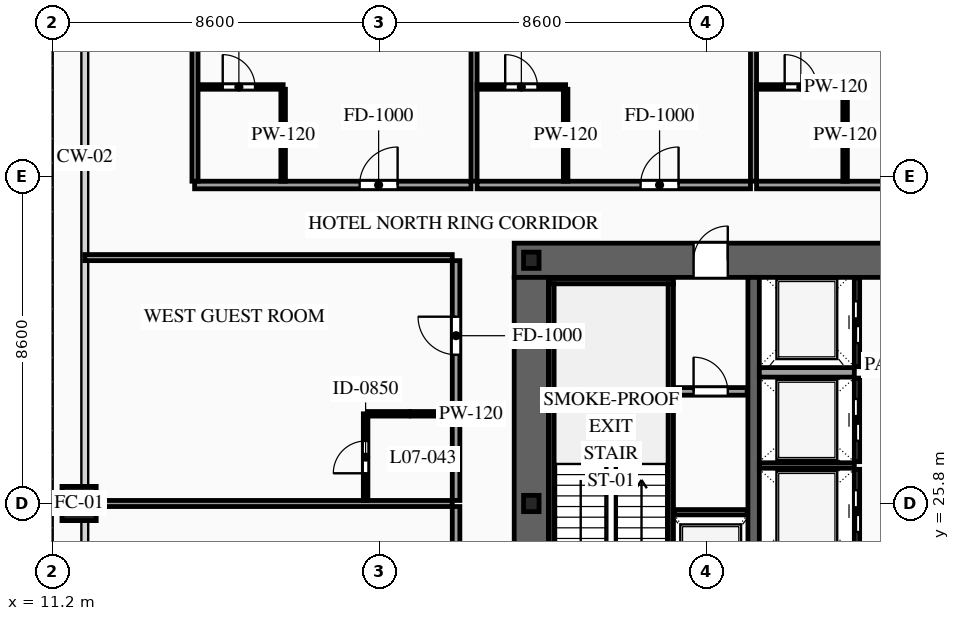
"""IFC4 building model, lengths in metres.
Left out: names, types, materials, properties, quantities, classifications, styles, units other than length and angle.
Written with IfcOpenShell. Run it as: python <this file> out.ifc"""

import sys

from ifc_helpers import new_model, si_unit, direction, frame, frame_2d, origin, origin_2d, place, context, subcontext, project, spatial, rectangle, hollow_rectangle, i_section, extrude, source, transform, mapped, element, fill, save


model = new_model("IFC4")
c1 = context("Model", 3, precision=1e-05, world=origin(), true_north=direction((0.0, 1.0)))
c2 = subcontext(c1, "Body", "Model", "MODEL_VIEW")
j1 = project(units=[si_unit("LENGTHUNIT", "METRE"), si_unit("PLANEANGLEUNIT", "RADIAN")], contexts=[c1])
p1 = place(None, origin())
s1 = spatial("IfcSite", under=j1, at=p1, CompositionType="ELEMENT")
p2 = place(p1, origin())
s2 = spatial("IfcBuilding", under=s1, at=p2, CompositionType="ELEMENT")
p3 = place(p2, frame((0.0, 0.0, 30.6)))
s3 = spatial("IfcBuildingStorey", under=s2, at=p3, CompositionType="ELEMENT", Elevation=30.6)
p4 = place(p3, frame((23.35, 32.2, 0.0), z_axis=(0.0, 0.0, 1.0), x_axis=(1.0, 0.0, 0.0)))
e1 = element("IfcWall", 1, at=p4, inside=s3, PredefinedType="SHEAR", context=c2, shape_type="SweptSolid", body=[
    extrude(rectangle(XDim=27.3, YDim=0.9, at=frame_2d((13.65, 0.0))), origin(), (0.0, 0.0, 1.0), 3.6),
])
p5 = place(p4, frame((4.72, 0.0, 0.0)))
e2 = element("IfcOpeningElement", 2, at=p5, cuts=e1, PredefinedType="OPENING", context=c2, shape_type="SweptSolid", body=[
    extrude(rectangle(XDim=0.9, YDim=2.15, at=frame_2d((0.45, 1.075))), frame((0.0, 0.465, 0.0), z_axis=(0.0, -1.0, 0.0), x_axis=(1.0, 0.0, 0.0)), (0.0, 0.0, 1.0), 0.93),
])
p6 = place(p4, frame((10.0, 0.0, 0.0)))
e3 = element("IfcOpeningElement", 3, at=p6, cuts=e1, PredefinedType="OPENING", context=c2, shape_type="SweptSolid", body=[
    extrude(rectangle(XDim=1.1, YDim=2.2, at=frame_2d((0.55, 1.1))), frame((0.0, 0.465, 0.0), z_axis=(0.0, -1.0, 0.0), x_axis=(1.0, 0.0, 0.0)), (0.0, 0.0, 1.0), 0.93),
])
p7 = place(p4, frame((15.85, 0.0, 0.0)))
e4 = element("IfcOpeningElement", 4, at=p7, cuts=e1, PredefinedType="OPENING", context=c2, shape_type="SweptSolid", body=[
    extrude(rectangle(XDim=1.1, YDim=2.2, at=frame_2d((0.55, 1.1))), frame((0.0, 0.465, 0.0), z_axis=(0.0, -1.0, 0.0), x_axis=(1.0, 0.0, 0.0)), (0.0, 0.0, 1.0), 0.93),
])
m1 = source(origin(), c2, "Body", "SweptSolid", [
    extrude(rectangle(XDim=11.9, YDim=0.9, at=frame_2d((5.95, 0.0))), origin(), (0.0, 0.0, 1.0), 3.6),
])
p8 = place(p3, frame((23.8, 19.85, 0.0), z_axis=(0.0, 0.0, 1.0), x_axis=(0.0, 1.0, 0.0)))
e5 = element("IfcWall", 5, at=p8, inside=s3, PredefinedType="SHEAR", context=c2, shape_type="MappedRepresentation", body=[
    mapped(m1, transform((0.0, 0.0, 0.0), scale=1.0)),
])
m2 = source(origin(), c2, "Body", "SweptSolid", [
    extrude(rectangle(XDim=11.9, YDim=0.3, at=frame_2d((5.95, 0.0))), origin(), (0.0, 0.0, 1.0), 3.6),
])
p9 = place(p3, frame((29.65, 19.85, 0.0), z_axis=(0.0, 0.0, 1.0), x_axis=(0.0, 1.0, 0.0)))
e6 = element("IfcWall", 6, at=p9, inside=s3, PredefinedType="SOLIDWALL", context=c2, shape_type="MappedRepresentation", body=[
    mapped(m2, transform((0.0, 0.0, 0.0), scale=1.0)),
])
m3 = source(origin(), c2, "Body", "SweptSolid", [
    extrude(i_section(OverallWidth=0.407, OverallDepth=0.428, WebThickness=0.02, FlangeThickness=0.035, at=origin_2d()), origin(), (0.0, 0.0, 1.0), 3.6),
])
for number, where, z_axis, x_axis in (
    (7, (23.8, 25.8, 0.0), (0.0, 0.0, 1.0), (1.0, 0.0, 0.0)),
    (8, (23.8, 32.2, 0.0), (0.0, 0.0, 1.0), (1.0, 0.0, 0.0)),
):
    element("IfcColumn", number, at=place(p3, frame(where, z_axis=z_axis, x_axis=x_axis)), inside=s3, PredefinedType="COLUMN", context=c2, shape_type="MappedRepresentation", body=[
        mapped(m3, transform((0.0, 0.0, 0.0), scale=1.0)),
    ])
m4 = source(origin(), c2, "Body", "SweptSolid", [
    extrude(hollow_rectangle(XDim=0.9, YDim=0.9, WallThickness=0.042, at=origin_2d()), origin(), (0.0, 0.0, 1.0), 3.6),
])
p10 = place(p3, frame((11.9, 25.8, 0.0), z_axis=(0.0, 0.0, 1.0), x_axis=(1.0, 0.0, 0.0)))
e9 = element("IfcColumn", 9, at=p10, inside=s3, PredefinedType="COLUMN", context=c2, shape_type="MappedRepresentation", body=[
    mapped(m4, transform((0.0, 0.0, 0.0), scale=1.0)),
])
m5 = source(origin(), c2, "Body", "SweptSolid", [
    extrude(rectangle(XDim=1.92, YDim=0.14, at=frame_2d((0.96, 0.0))), origin(), (0.0, 0.0, 1.0), 3.38),
])
p11 = place(p3, frame((27.56, 25.57, 0.0), z_axis=(0.0, 0.0, 1.0), x_axis=(1.0, 0.0, 0.0)))
e10 = element("IfcWall", 10, at=p11, inside=s3, PredefinedType="SOLIDWALL", context=c2, shape_type="MappedRepresentation", body=[
    mapped(m5, transform((0.0, 0.0, 0.0), scale=1.0)),
])
p12 = place(p3, frame((32.37, 24.5, 0.0), z_axis=(0.0, 0.0, 1.0), x_axis=(0.0, 1.0, 0.0)))
e11 = element("IfcWall", 11, at=p12, inside=s3, PredefinedType="SOLIDWALL", context=c2, shape_type="SweptSolid", body=[
    extrude(rectangle(XDim=2.2, YDim=0.14, at=frame_2d((1.1, 0.0))), origin(), (0.0, 0.0, 1.0), 3.38),
])
p13 = place(p12, frame((0.55, 0.0, 0.0)))
e12 = element("IfcOpeningElement", 12, at=p13, cuts=e11, PredefinedType="OPENING", context=c2, shape_type="SweptSolid", body=[
    extrude(rectangle(XDim=1.1, YDim=2.2, at=frame_2d((0.55, 1.1))), frame((0.0, 0.085, 0.0), z_axis=(0.0, -1.0, 0.0), x_axis=(1.0, 0.0, 0.0)), (0.0, 0.0, 1.0), 0.17),
])
m6 = source(origin(), c2, "Body", "SweptSolid", [
    extrude(rectangle(XDim=2.5, YDim=0.14, at=frame_2d((1.25, 0.0))), origin(), (0.0, 0.0, 1.0), 3.38),
])
p14 = place(p3, frame((29.8, 26.8, 0.0), z_axis=(0.0, 0.0, 1.0), x_axis=(1.0, 0.0, 0.0)))
e13 = element("IfcWall", 13, at=p14, inside=s3, PredefinedType="SOLIDWALL", context=c2, shape_type="MappedRepresentation", body=[
    mapped(m6, transform((0.0, 0.0, 0.0), scale=1.0)),
])
p15 = place(p3, frame((32.37, 26.9, 0.0), z_axis=(0.0, 0.0, 1.0), x_axis=(0.0, 1.0, 0.0)))
e14 = element("IfcWall", 14, at=p15, inside=s3, PredefinedType="SOLIDWALL", context=c2, shape_type="SweptSolid", body=[
    extrude(rectangle(XDim=2.2, YDim=0.14, at=frame_2d((1.1, 0.0))), origin(), (0.0, 0.0, 1.0), 3.38),
])
p16 = place(p15, frame((0.55, 0.0, 0.0)))
e15 = element("IfcOpeningElement", 15, at=p16, cuts=e14, PredefinedType="OPENING", context=c2, shape_type="SweptSolid", body=[
    extrude(rectangle(XDim=1.1, YDim=2.2, at=frame_2d((0.55, 1.1))), frame((0.0, 0.085, 0.0), z_axis=(0.0, -1.0, 0.0), x_axis=(1.0, 0.0, 0.0)), (0.0, 0.0, 1.0), 0.17),
])
p17 = place(p3, frame((32.37, 29.4, 0.0), z_axis=(0.0, 0.0, 1.0), x_axis=(0.0, 1.0, 0.0)))
e16 = element("IfcWall", 16, at=p17, inside=s3, PredefinedType="SOLIDWALL", context=c2, shape_type="SweptSolid", body=[
    extrude(rectangle(XDim=2.34, YDim=0.14, at=frame_2d((1.17, 0.0))), origin(), (0.0, 0.0, 1.0), 3.38),
])
p18 = place(p17, frame((0.62, 0.0, 0.0)))
e17 = element("IfcOpeningElement", 17, at=p18, cuts=e16, PredefinedType="OPENING", context=c2, shape_type="SweptSolid", body=[
    extrude(rectangle(XDim=1.1, YDim=2.2, at=frame_2d((0.55, 1.1))), frame((0.0, 0.085, 0.0), z_axis=(0.0, -1.0, 0.0), x_axis=(1.0, 0.0, 0.0)), (0.0, 0.0, 1.0), 0.17),
])
m7 = source(origin(), c2, "Body", "SweptSolid", [
    extrude(rectangle(XDim=2.5, YDim=0.25, at=frame_2d((1.25, 0.0))), origin(), (0.0, 0.0, 1.0), 3.38),
])
p19 = place(p3, frame((29.8, 29.25, 0.0), z_axis=(0.0, 0.0, 1.0), x_axis=(1.0, 0.0, 0.0)))
e18 = element("IfcWall", 18, at=p19, inside=s3, PredefinedType="SOLIDWALL", context=c2, shape_type="MappedRepresentation", body=[
    mapped(m7, transform((0.0, 0.0, 0.0), scale=1.0)),
])
m8 = source(origin(), c2, "Body", "SweptSolid", [
    extrude(rectangle(XDim=3.28, YDim=0.14, at=frame_2d((1.64, 0.0))), origin(), (0.0, 0.0, 1.0), 3.38),
])
p20 = place(p3, frame((24.26, 31.65, 0.0), z_axis=(0.0, 0.0, 1.0), x_axis=(1.0, 0.0, 0.0)))
e19 = element("IfcWall", 19, at=p20, inside=s3, PredefinedType="SOLIDWALL", context=c2, shape_type="MappedRepresentation", body=[
    mapped(m8, transform((0.0, 0.0, 0.0), scale=1.0)),
])
m9 = source(origin(), c2, "Body", "SweptSolid", [
    extrude(rectangle(XDim=8.94, YDim=0.14, at=frame_2d((4.47, 0.0))), origin(), (0.0, 0.0, 1.0), 3.38),
])
for number, where, z_axis, x_axis in (
    (20, (24.33, 22.64, 0.0), (0.0, 0.0, 1.0), (0.0, 1.0, 0.0)),
    (21, (27.47, 22.64, 0.0), (0.0, 0.0, 1.0), (0.0, 1.0, 0.0)),
):
    element("IfcWall", number, at=place(p3, frame(where, z_axis=z_axis, x_axis=x_axis)), inside=s3, PredefinedType="SOLIDWALL", context=c2, shape_type="MappedRepresentation", body=[
        mapped(m9, transform((0.0, 0.0, 0.0), scale=1.0)),
    ])
p21 = place(p3, frame((27.56, 28.75, 0.0), z_axis=(0.0, 0.0, 1.0), x_axis=(1.0, 0.0, 0.0)))
e22 = element("IfcWall", 22, at=p21, inside=s3, PredefinedType="PARTITIONING", context=c2, shape_type="SweptSolid", body=[
    extrude(rectangle(XDim=1.92, YDim=0.2, at=frame_2d((0.96, 0.0))), origin(), (0.0, 0.0, 1.0), 3.38),
])
p22 = place(p21, frame((0.51, 0.0, 0.0)))
e23 = element("IfcOpeningElement", 23, at=p22, cuts=e22, PredefinedType="OPENING", context=c2, shape_type="SweptSolid", body=[
    extrude(rectangle(XDim=0.9, YDim=2.15, at=frame_2d((0.45, 1.075))), frame((0.0, 0.115, 0.0), z_axis=(0.0, -1.0, 0.0), x_axis=(1.0, 0.0, 0.0)), (0.0, 0.0, 1.0), 0.23),
])
p23 = place(p3, frame((14.94, 34.18, 0.0), z_axis=(0.0, 0.0, 1.0), x_axis=(1.0, 0.0, 0.0)))
e24 = element("IfcWall", 24, at=p23, inside=s3, PredefinedType="PARTITIONING", context=c2, shape_type="SweptSolid", body=[
    extrude(rectangle(XDim=7.273, YDim=0.2, at=frame_2d((3.636, 0.0))), origin(), (0.0, 0.0, 1.0), 3.38),
])
p24 = place(p23, frame((4.342, 0.0, 0.0)))
e25 = element("IfcOpeningElement", 25, at=p24, cuts=e24, PredefinedType="OPENING", context=c2, shape_type="SweptSolid", body=[
    extrude(rectangle(XDim=1.0, YDim=2.2, at=frame_2d((0.5, 1.1))), frame((0.0, 0.115, 0.0), z_axis=(0.0, -1.0, 0.0), x_axis=(1.0, 0.0, 0.0)), (0.0, 0.0, 1.0), 0.23),
])
m10 = source(origin(), c2, "Body", "SweptSolid", [
    extrude(rectangle(XDim=16.47, YDim=0.16, at=frame_2d((8.235, 0.0))), origin(), (0.0, 0.0, 1.0), 3.38),
])
p25 = place(p3, frame((22.293, 34.28, 0.0), z_axis=(0.0, 0.0, 1.0), x_axis=(0.0, 1.0, 0.0)))
e26 = element("IfcWall", 26, at=p25, inside=s3, PredefinedType="PARTITIONING", context=c2, shape_type="MappedRepresentation", body=[
    mapped(m10, transform((0.0, 0.0, 0.0), scale=1.0)),
])
p26 = place(p3, frame((14.94, 36.76, 0.0), z_axis=(0.0, 0.0, 1.0), x_axis=(1.0, 0.0, 0.0)))
e27 = element("IfcWall", 27, at=p26, inside=s3, PredefinedType="PARTITIONING", context=c2, shape_type="SweptSolid", body=[
    extrude(rectangle(XDim=2.33, YDim=0.12, at=frame_2d((1.165, 0.0))), origin(), (0.0, 0.0, 1.0), 3.38),
])
p27 = place(p26, frame((0.74, 0.0, 0.0)))
e28 = element("IfcOpeningElement", 28, at=p27, cuts=e27, PredefinedType="OPENING", context=c2, shape_type="SweptSolid", body=[
    extrude(rectangle(XDim=0.85, YDim=2.1, at=frame_2d((0.425, 1.05))), frame((0.0, 0.075, 0.0), z_axis=(0.0, -1.0, 0.0), x_axis=(1.0, 0.0, 0.0)), (0.0, 0.0, 1.0), 0.15),
])
m11 = source(origin(), c2, "Body", "SweptSolid", [
    extrude(rectangle(XDim=2.42, YDim=0.12, at=frame_2d((1.21, 0.0))), origin(), (0.0, 0.0, 1.0), 3.38),
])
p28 = place(p3, frame((17.27, 34.28, 0.0), z_axis=(0.0, 0.0, 1.0), x_axis=(0.0, 1.0, 0.0)))
e29 = element("IfcWall", 29, at=p28, inside=s3, PredefinedType="PARTITIONING", context=c2, shape_type="MappedRepresentation", body=[
    mapped(m11, transform((0.0, 0.0, 0.0), scale=1.0)),
])
p29 = place(p3, frame((22.373, 34.18, 0.0), z_axis=(0.0, 0.0, 1.0), x_axis=(1.0, 0.0, 0.0)))
e30 = element("IfcWall", 30, at=p29, inside=s3, PredefinedType="PARTITIONING", context=c2, shape_type="SweptSolid", body=[
    extrude(rectangle(XDim=7.194, YDim=0.2, at=frame_2d((3.597, 0.0))), origin(), (0.0, 0.0, 1.0), 3.38),
])
p30 = place(p29, frame((4.302, 0.0, 0.0)))
e31 = element("IfcOpeningElement", 31, at=p30, cuts=e30, PredefinedType="OPENING", context=c2, shape_type="SweptSolid", body=[
    extrude(rectangle(XDim=1.0, YDim=2.2, at=frame_2d((0.5, 1.1))), frame((0.0, 0.115, 0.0), z_axis=(0.0, -1.0, 0.0), x_axis=(1.0, 0.0, 0.0)), (0.0, 0.0, 1.0), 0.23),
])
p31 = place(p3, frame((29.647, 34.28, 0.0), z_axis=(0.0, 0.0, 1.0), x_axis=(0.0, 1.0, 0.0)))
e32 = element("IfcWall", 32, at=p31, inside=s3, PredefinedType="PARTITIONING", context=c2, shape_type="MappedRepresentation", body=[
    mapped(m10, transform((0.0, 0.0, 0.0), scale=1.0)),
])
p32 = place(p3, frame((22.373, 36.76, 0.0), z_axis=(0.0, 0.0, 1.0), x_axis=(1.0, 0.0, 0.0)))
e33 = element("IfcWall", 33, at=p32, inside=s3, PredefinedType="PARTITIONING", context=c2, shape_type="SweptSolid", body=[
    extrude(rectangle(XDim=2.33, YDim=0.12, at=frame_2d((1.165, 0.0))), origin(), (0.0, 0.0, 1.0), 3.38),
])
p33 = place(p32, frame((0.74, 0.0, 0.0)))
e34 = element("IfcOpeningElement", 34, at=p33, cuts=e33, PredefinedType="OPENING", context=c2, shape_type="SweptSolid", body=[
    extrude(rectangle(XDim=0.85, YDim=2.1, at=frame_2d((0.425, 1.05))), frame((0.0, 0.075, 0.0), z_axis=(0.0, -1.0, 0.0), x_axis=(1.0, 0.0, 0.0)), (0.0, 0.0, 1.0), 0.15),
])
p34 = place(p3, frame((24.703, 34.28, 0.0), z_axis=(0.0, 0.0, 1.0), x_axis=(0.0, 1.0, 0.0)))
e35 = element("IfcWall", 35, at=p34, inside=s3, PredefinedType="PARTITIONING", context=c2, shape_type="MappedRepresentation", body=[
    mapped(m11, transform((0.0, 0.0, 0.0), scale=1.0)),
])
p35 = place(p3, frame((29.727, 34.18, 0.0), z_axis=(0.0, 0.0, 1.0), x_axis=(1.0, 0.0, 0.0)))
e36 = element("IfcWall", 36, at=p35, inside=s3, PredefinedType="PARTITIONING", context=c2, shape_type="SweptSolid", body=[
    extrude(rectangle(XDim=7.193, YDim=0.2, at=frame_2d((3.596, 0.0))), origin(), (0.0, 0.0, 1.0), 3.38),
])
p36 = place(p35, frame((4.302, 0.0, 0.0)))
e37 = element("IfcOpeningElement", 37, at=p36, cuts=e36, PredefinedType="OPENING", context=c2, shape_type="SweptSolid", body=[
    extrude(rectangle(XDim=1.0, YDim=2.2, at=frame_2d((0.5, 1.1))), frame((0.0, 0.115, 0.0), z_axis=(0.0, -1.0, 0.0), x_axis=(1.0, 0.0, 0.0)), (0.0, 0.0, 1.0), 0.23),
])
p37 = place(p3, frame((29.727, 36.76, 0.0), z_axis=(0.0, 0.0, 1.0), x_axis=(1.0, 0.0, 0.0)))
e38 = element("IfcWall", 38, at=p37, inside=s3, PredefinedType="PARTITIONING", context=c2, shape_type="SweptSolid", body=[
    extrude(rectangle(XDim=2.33, YDim=0.12, at=frame_2d((1.165, 0.0))), origin(), (0.0, 0.0, 1.0), 3.38),
])
p38 = place(p37, frame((0.74, 0.0, 0.0)))
e39 = element("IfcOpeningElement", 39, at=p38, cuts=e38, PredefinedType="OPENING", context=c2, shape_type="SweptSolid", body=[
    extrude(rectangle(XDim=0.85, YDim=2.1, at=frame_2d((0.425, 1.05))), frame((0.0, 0.075, 0.0), z_axis=(0.0, -1.0, 0.0), x_axis=(1.0, 0.0, 0.0)), (0.0, 0.0, 1.0), 0.15),
])
p39 = place(p3, frame((32.057, 34.28, 0.0), z_axis=(0.0, 0.0, 1.0), x_axis=(0.0, 1.0, 0.0)))
e40 = element("IfcWall", 40, at=p39, inside=s3, PredefinedType="PARTITIONING", context=c2, shape_type="MappedRepresentation", body=[
    mapped(m11, transform((0.0, 0.0, 0.0), scale=1.0)),
])
m12 = source(origin(), c2, "Body", "SweptSolid", [
    extrude(rectangle(XDim=16.32, YDim=0.16, at=frame_2d((8.16, 0.0))), origin(), (0.0, 0.0, 1.0), 3.38),
])
p40 = place(p3, frame((14.95, 34.28, 0.0), z_axis=(0.0, 0.0, 1.0), x_axis=(0.0, 1.0, 0.0)))
e41 = element("IfcWall", 41, at=p40, inside=s3, PredefinedType="PARTITIONING", context=c2, shape_type="MappedRepresentation", body=[
    mapped(m12, transform((0.0, 0.0, 0.0), scale=1.0)),
])
p41 = place(p3, frame((21.82, 19.41, 0.0), z_axis=(0.0, 0.0, 1.0), x_axis=(0.0, 1.0, 0.0)))
e42 = element("IfcWall", 42, at=p41, inside=s3, PredefinedType="PARTITIONING", context=c2, shape_type="SweptSolid", body=[
    extrude(rectangle(XDim=6.31, YDim=0.2, at=frame_2d((3.155, 0.0))), origin(), (0.0, 0.0, 1.0), 3.38),
])
p42 = place(p41, frame((3.835, 0.0, 0.0)))
e43 = element("IfcOpeningElement", 43, at=p42, cuts=e42, PredefinedType="OPENING", context=c2, shape_type="SweptSolid", body=[
    extrude(rectangle(XDim=1.0, YDim=2.2, at=frame_2d((0.5, 1.1))), frame((0.0, 0.115, 0.0), z_axis=(0.0, -1.0, 0.0), x_axis=(1.0, 0.0, 0.0)), (0.0, 0.0, 1.0), 0.23),
])
m13 = source(origin(), c2, "Body", "SweptSolid", [
    extrude(rectangle(XDim=9.67, YDim=0.16, at=frame_2d((4.835, 0.0))), origin(), (0.0, 0.0, 1.0), 2.575),
])
p43 = place(p3, frame((12.05, 25.8, 0.0), z_axis=(0.0, 0.0, 1.0), x_axis=(1.0, 0.0, 0.0)))
e44 = element("IfcWall", 44, at=p43, inside=s3, PredefinedType="PARTITIONING", context=c2, shape_type="MappedRepresentation", body=[
    mapped(m13, transform((0.0, 0.0, 0.0), scale=1.0)),
])
p44 = place(p3, frame((21.82, 25.88, 0.0), z_axis=(0.0, 0.0, 1.0), x_axis=(0.0, 1.0, 0.0)))
e45 = element("IfcWall", 45, at=p44, inside=s3, PredefinedType="PARTITIONING", context=c2, shape_type="SweptSolid", body=[
    extrude(rectangle(XDim=6.31, YDim=0.2, at=frame_2d((3.155, 0.0))), origin(), (0.0, 0.0, 1.0), 3.38),
])
p45 = place(p44, frame((3.835, 0.0, 0.0)))
e46 = element("IfcOpeningElement", 46, at=p45, cuts=e45, PredefinedType="OPENING", context=c2, shape_type="SweptSolid", body=[
    extrude(rectangle(XDim=1.0, YDim=2.2, at=frame_2d((0.5, 1.1))), frame((0.0, 0.115, 0.0), z_axis=(0.0, -1.0, 0.0), x_axis=(1.0, 0.0, 0.0)), (0.0, 0.0, 1.0), 0.23),
])
m14 = source(origin(), c2, "Body", "SweptSolid", [
    extrude(rectangle(XDim=9.67, YDim=0.16, at=frame_2d((4.835, 0.0))), origin(), (0.0, 0.0, 1.0), 2.875),
])
p46 = place(p3, frame((12.05, 32.27, 0.0), z_axis=(0.0, 0.0, 1.0), x_axis=(1.0, 0.0, 0.0)))
e47 = element("IfcWall", 47, at=p46, inside=s3, PredefinedType="PARTITIONING", context=c2, shape_type="MappedRepresentation", body=[
    mapped(m14, transform((0.0, 0.0, 0.0), scale=1.0)),
])
p47 = place(p3, frame((19.44, 25.88, 0.0), z_axis=(0.0, 0.0, 1.0), x_axis=(0.0, 1.0, 0.0)))
e48 = element("IfcWall", 48, at=p47, inside=s3, PredefinedType="PARTITIONING", context=c2, shape_type="SweptSolid", body=[
    extrude(rectangle(XDim=2.28, YDim=0.12, at=frame_2d((1.14, 0.0))), origin(), (0.0, 0.0, 1.0), 3.38),
])
p48 = place(p47, frame((0.715, 0.0, 0.0)))
e49 = element("IfcOpeningElement", 49, at=p48, cuts=e48, PredefinedType="OPENING", context=c2, shape_type="SweptSolid", body=[
    extrude(rectangle(XDim=0.85, YDim=2.1, at=frame_2d((0.425, 1.05))), frame((0.0, 0.075, 0.0), z_axis=(0.0, -1.0, 0.0), x_axis=(1.0, 0.0, 0.0)), (0.0, 0.0, 1.0), 0.15),
])
m15 = source(origin(), c2, "Body", "SweptSolid", [
    extrude(rectangle(XDim=2.22, YDim=0.12, at=frame_2d((1.11, 0.0))), origin(), (0.0, 0.0, 1.0), 3.38),
])
p49 = place(p3, frame((19.5, 28.16, 0.0), z_axis=(0.0, 0.0, 1.0), x_axis=(1.0, 0.0, 0.0)))
e50 = element("IfcWall", 50, at=p49, inside=s3, PredefinedType="PARTITIONING", context=c2, shape_type="MappedRepresentation", body=[
    mapped(m15, transform((0.0, 0.0, 0.0), scale=1.0)),
])
m16 = source(origin(), c2, "Body", "SweptSolid", [
    extrude(rectangle(XDim=1.1, YDim=2.2, at=frame_2d((0.55, 1.1))), frame((0.0, 0.025, 0.0), z_axis=(0.0, -1.0, 0.0), x_axis=(1.0, 0.0, 0.0)), (0.0, 0.0, 1.0), 0.05),
])
p50 = place(p13, origin())
e51 = element("IfcDoor", 51, at=p50, inside=s3, OperationType="SLIDING_TO_LEFT", PredefinedType="DOOR", context=c2, shape_type="MappedRepresentation", body=[
    mapped(m16, transform((0.0, 0.0, 0.0), scale=1.0)),
])
fill(e12, e51)
p51 = place(p16, origin())
e52 = element("IfcDoor", 52, at=p51, inside=s3, OperationType="SLIDING_TO_RIGHT", PredefinedType="DOOR", context=c2, shape_type="MappedRepresentation", body=[
    mapped(m16, transform((0.0, 0.0, 0.0), scale=1.0)),
])
fill(e15, e52)
p52 = place(p18, origin())
e53 = element("IfcDoor", 53, at=p52, inside=s3, OperationType="SLIDING_TO_LEFT", PredefinedType="DOOR", context=c2, shape_type="MappedRepresentation", body=[
    mapped(m16, transform((0.0, 0.0, 0.0), scale=1.0)),
])
fill(e17, e53)
m17 = source(origin(), c2, "Body", "SweptSolid", [
    extrude(rectangle(XDim=0.9, YDim=2.15, at=frame_2d((0.45, 1.075))), frame((0.0, 0.025, 0.0), z_axis=(0.0, -1.0, 0.0), x_axis=(1.0, 0.0, 0.0)), (0.0, 0.0, 1.0), 0.05),
])
p53 = place(p5, origin())
e54 = element("IfcDoor", 54, at=p53, inside=s3, OperationType="SINGLE_SWING_RIGHT", PredefinedType="DOOR", context=c2, shape_type="MappedRepresentation", body=[
    mapped(m17, transform((0.0, 0.0, 0.0), scale=1.0)),
])
fill(e2, e54)
p54 = place(p22, origin())
e55 = element("IfcDoor", 55, at=p54, inside=s3, OperationType="SINGLE_SWING_LEFT", PredefinedType="DOOR", context=c2, shape_type="MappedRepresentation", body=[
    mapped(m17, transform((0.0, 0.0, 0.0), scale=1.0)),
])
fill(e23, e55)
m18 = source(origin(), c2, "Body", "SweptSolid", [
    extrude(rectangle(XDim=1.0, YDim=2.2, at=frame_2d((0.5, 1.1))), frame((0.0, 0.025, 0.0), z_axis=(0.0, -1.0, 0.0), x_axis=(1.0, 0.0, 0.0)), (0.0, 0.0, 1.0), 0.05),
])
p55 = place(p24, origin())
e56 = element("IfcDoor", 56, at=p55, inside=s3, OperationType="SINGLE_SWING_RIGHT", PredefinedType="DOOR", context=c2, shape_type="MappedRepresentation", body=[
    mapped(m18, transform((0.0, 0.0, 0.0), scale=1.0)),
])
fill(e25, e56)
m19 = source(origin(), c2, "Body", "SweptSolid", [
    extrude(rectangle(XDim=0.85, YDim=2.1, at=frame_2d((0.425, 1.05))), frame((0.0, 0.025, 0.0), z_axis=(0.0, -1.0, 0.0), x_axis=(1.0, 0.0, 0.0)), (0.0, 0.0, 1.0), 0.05),
])
p56 = place(p27, origin())
e57 = element("IfcDoor", 57, at=p56, inside=s3, OperationType="SINGLE_SWING_LEFT", PredefinedType="DOOR", context=c2, shape_type="MappedRepresentation", body=[
    mapped(m19, transform((0.0, 0.0, 0.0), scale=1.0)),
])
fill(e28, e57)
p57 = place(p30, origin())
e58 = element("IfcDoor", 58, at=p57, inside=s3, OperationType="SINGLE_SWING_RIGHT", PredefinedType="DOOR", context=c2, shape_type="MappedRepresentation", body=[
    mapped(m18, transform((0.0, 0.0, 0.0), scale=1.0)),
])
fill(e31, e58)
p58 = place(p33, origin())
e59 = element("IfcDoor", 59, at=p58, inside=s3, OperationType="SINGLE_SWING_LEFT", PredefinedType="DOOR", context=c2, shape_type="MappedRepresentation", body=[
    mapped(m19, transform((0.0, 0.0, 0.0), scale=1.0)),
])
fill(e34, e59)
p59 = place(p38, origin())
e60 = element("IfcDoor", 60, at=p59, inside=s3, OperationType="SINGLE_SWING_LEFT", PredefinedType="DOOR", context=c2, shape_type="MappedRepresentation", body=[
    mapped(m19, transform((0.0, 0.0, 0.0), scale=1.0)),
])
fill(e39, e60)
p60 = place(p45, origin())
e61 = element("IfcDoor", 61, at=p60, inside=s3, OperationType="SINGLE_SWING_RIGHT", PredefinedType="DOOR", context=c2, shape_type="MappedRepresentation", body=[
    mapped(m18, transform((0.0, 0.0, 0.0), scale=1.0)),
])
fill(e46, e61)
p61 = place(p48, origin())
e62 = element("IfcDoor", 62, at=p61, inside=s3, OperationType="SINGLE_SWING_LEFT", PredefinedType="DOOR", context=c2, shape_type="MappedRepresentation", body=[
    mapped(m19, transform((0.0, 0.0, 0.0), scale=1.0)),
])
fill(e49, e62)
save(model, sys.argv[1])
